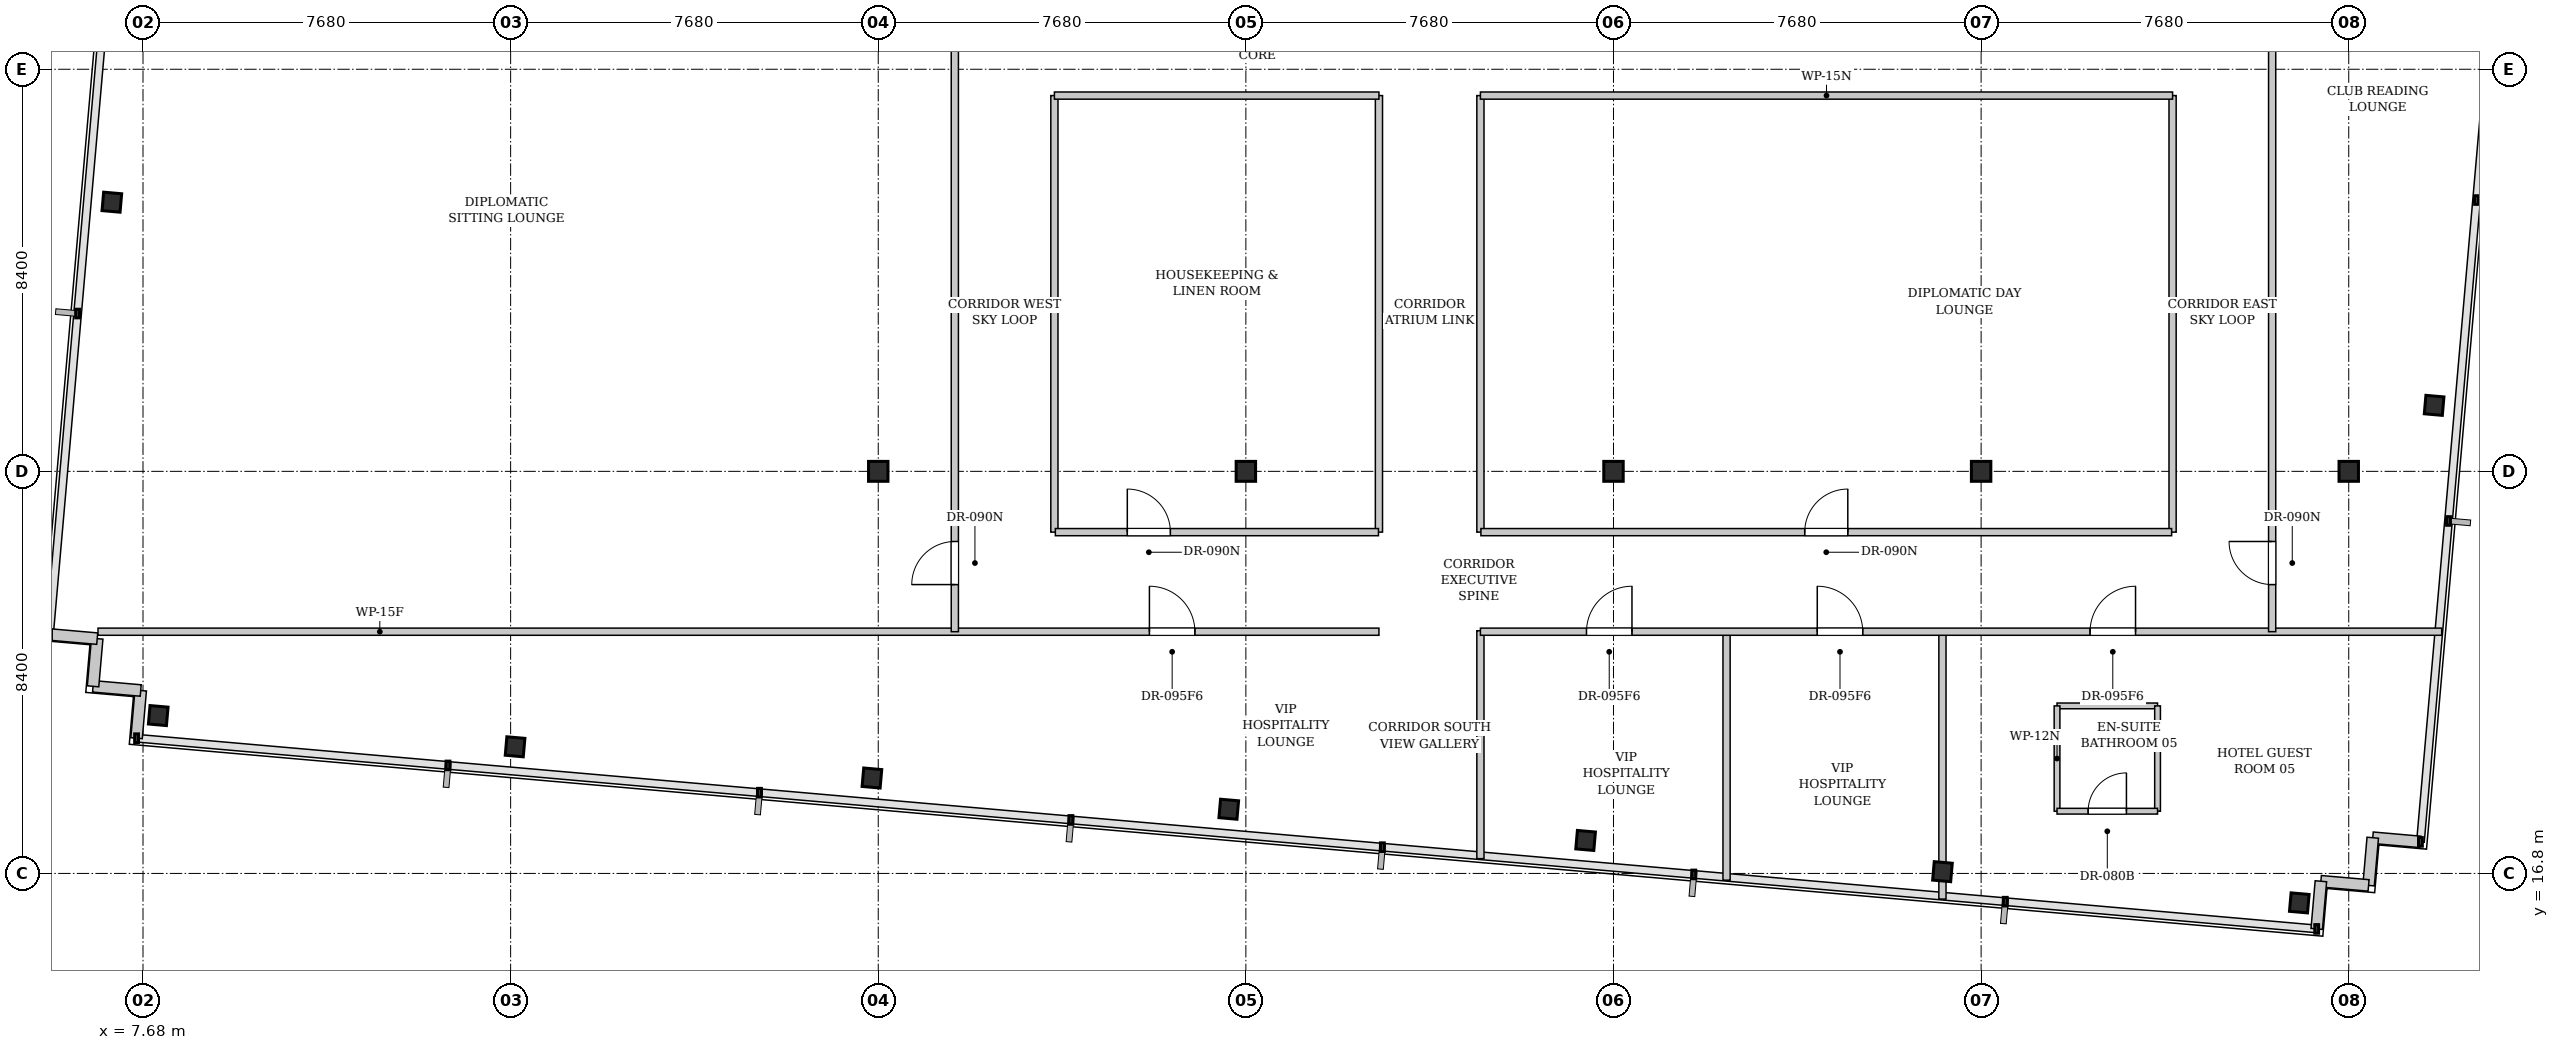
"""IFC4 building model, lengths in metres.
Left out: names, types, materials, properties, quantities, classifications, styles, units other than length and angle.
Written with IfcOpenShell. Run it as: python <this file> out.ifc"""

import sys

from ifc_helpers import new_model, si_unit, direction, frame, frame_2d, origin, origin_2d, place, context, subcontext, project, spatial, rectangle, i_section, extrude, element, fill, save


model = new_model("IFC4")
c1 = context("Model", 3, precision=1e-05, world=origin(), true_north=direction((0.0, 1.0)))
c2 = subcontext(c1, "Body", "Model", "MODEL_VIEW")
j1 = project(units=[si_unit("LENGTHUNIT", "METRE"), si_unit("PLANEANGLEUNIT", "RADIAN")], contexts=[c1])
p1 = place(None, origin())
s1 = spatial("IfcSite", under=j1, at=p1, CompositionType="ELEMENT")
p2 = place(p1, origin())
s2 = spatial("IfcBuilding", under=s1, at=p2, CompositionType="ELEMENT")
p3 = place(p2, frame((0.0, 0.0, 276.1)))
s3 = spatial("IfcBuildingStorey", under=s2, at=p3, CompositionType="ELEMENT", Elevation=276.1)
for number, where, z_axis, x_axis in (
    (1, (23.04, 25.2, 0.0), (0.0, 0.0, 1.0), (1.0, 0.0, 0.0)),
    (2, (30.72, 25.2, 0.0), (0.0, 0.0, 1.0), (1.0, 0.0, 0.0)),
    (3, (38.4, 25.2, 0.0), (0.0, 0.0, 1.0), (1.0, 0.0, 0.0)),
    (4, (46.08, 25.2, 0.0), (0.0, 0.0, 1.0), (1.0, 0.0, 0.0)),
    (5, (53.76, 25.2, 0.0), (0.0, 0.0, 1.0), (1.0, 0.0, 0.0)),
):
    element("IfcColumn", number, at=place(p3, frame(where, z_axis=z_axis, x_axis=x_axis)), inside=s3, PredefinedType="COLUMN", context=c2, shape_type="SweptSolid", body=[
        extrude(i_section(OverallWidth=0.406, OverallDepth=0.416, WebThickness=0.03, FlangeThickness=0.048, FilletRadius=0.015, at=origin_2d()), origin(), (0.0, 0.0, 1.0), 3.4),
    ])
for number, where, z_axis, x_axis in (
    (6, (7.998, 20.098, 0.0), (0.0, 0.0, 1.0), (0.996, -0.087, 0.0)),
    (7, (15.453, 19.446, 0.0), (0.0, 0.0, 1.0), (0.996, -0.087, 0.0)),
    (8, (22.908, 18.793, 0.0), (0.0, 0.0, 1.0), (0.996, -0.087, 0.0)),
    (9, (30.363, 18.141, 0.0), (0.0, 0.0, 1.0), (0.996, -0.087, 0.0)),
    (10, (37.817, 17.489, 0.0), (0.0, 0.0, 1.0), (0.996, -0.087, 0.0)),
    (11, (45.272, 16.837, 0.0), (0.0, 0.0, 1.0), (0.996, -0.087, 0.0)),
    (12, (52.727, 16.185, 0.0), (0.0, 0.0, 1.0), (0.996, -0.087, 0.0)),
    (13, (7.029, 30.823, 0.0), (0.0, 0.0, 1.0), (0.996, -0.087, 0.0)),
    (14, (55.544, 26.579, 0.0), (0.0, 0.0, 1.0), (0.996, -0.087, 0.0)),
):
    element("IfcColumn", number, at=place(p3, frame(where, z_axis=z_axis, x_axis=x_axis)), inside=s3, PredefinedType="COLUMN", context=c2, shape_type="SweptSolid", body=[
        extrude(i_section(OverallWidth=0.378, OverallDepth=0.387, WebThickness=0.021, FlangeThickness=0.033, FilletRadius=0.015, at=origin_2d()), origin(), (0.0, 0.0, 1.0), 3.4),
    ])
for number, where, z_axis, x_axis in (
    (15, (7.545, 19.625, 0.0), (0.0, 0.0, 1.0), (0.087, 0.996, 0.0)),
    (16, (7.632, 20.622, 0.0), (0.0, 0.0, 1.0), (-0.996, 0.087, 0.0)),
):
    element("IfcWall", number, at=place(p3, frame(where, z_axis=z_axis, x_axis=x_axis)), inside=s3, PredefinedType="SOLIDWALL", context=c2, shape_type="SweptSolid", body=[
        extrude(rectangle(XDim=1.0, YDim=0.24, at=frame_2d((0.5, 0.0))), origin(), (0.0, 0.0, 1.0), 3.18),
    ])
for number, where, z_axis, x_axis in (
    (17, (6.636, 20.709, 0.0), (0.0, 0.0, 1.0), (0.087, 0.996, 0.0)),
    (18, (6.723, 21.705, 0.0), (0.0, 0.0, 1.0), (-0.996, 0.087, 0.0)),
):
    element("IfcWall", number, at=place(p3, frame(where, z_axis=z_axis, x_axis=x_axis)), inside=s3, PredefinedType="SOLIDWALL", context=c2, shape_type="SweptSolid", body=[
        extrude(rectangle(XDim=1.0, YDim=0.24, at=frame_2d((0.5, 0.0))), origin(), (0.0, 0.0, 1.0), 3.18),
    ])
for number, where, z_axis, x_axis in (
    (19, (55.258, 17.459, 0.0), (0.0, 0.0, 1.0), (-0.996, 0.087, 0.0)),
    (20, (54.262, 17.546, 0.0), (0.0, 0.0, 1.0), (-0.087, -0.996, 0.0)),
):
    element("IfcWall", number, at=place(p3, frame(where, z_axis=z_axis, x_axis=x_axis)), inside=s3, PredefinedType="SOLIDWALL", context=c2, shape_type="SweptSolid", body=[
        extrude(rectangle(XDim=1.0, YDim=0.24, at=frame_2d((0.5, 0.0))), origin(), (0.0, 0.0, 1.0), 3.18),
    ])
for number, where, z_axis, x_axis in (
    (21, (54.175, 16.55, 0.0), (0.0, 0.0, 1.0), (-0.996, 0.087, 0.0)),
    (22, (53.178, 16.637, 0.0), (0.0, 0.0, 1.0), (-0.087, -0.996, 0.0)),
):
    element("IfcWall", number, at=place(p3, frame(where, z_axis=z_axis, x_axis=x_axis)), inside=s3, PredefinedType="SOLIDWALL", context=c2, shape_type="SweptSolid", body=[
        extrude(rectangle(XDim=1.0, YDim=0.24, at=frame_2d((0.5, 0.0))), origin(), (0.0, 0.0, 1.0), 3.18),
    ])
p4 = place(p3, frame((35.62, 17.109, 0.0), z_axis=(0.0, 0.0, 1.0), x_axis=(0.0, 1.0, 0.0)))
e23 = element("IfcWall", 23, at=p4, inside=s3, PredefinedType="PARTITIONING", context=c2, shape_type="SweptSolid", body=[
    extrude(rectangle(XDim=4.761, YDim=0.15, at=frame_2d((2.381, 0.0))), origin(), (0.0, 0.0, 1.0), 3.18),
])
p5 = place(p3, frame((40.762, 16.659, 0.0), z_axis=(0.0, 0.0, 1.0), x_axis=(0.0, 1.0, 0.0)))
e24 = element("IfcWall", 24, at=p5, inside=s3, PredefinedType="PARTITIONING", context=c2, shape_type="SweptSolid", body=[
    extrude(rectangle(XDim=5.211, YDim=0.15, at=frame_2d((2.605, 0.0))), origin(), (0.0, 0.0, 1.0), 3.18),
])
p6 = place(p3, frame((47.666, 20.3, 0.0), z_axis=(0.0, 0.0, 1.0), x_axis=(1.0, 0.0, 0.0)))
e25 = element("IfcWall", 25, at=p6, inside=s3, PredefinedType="PARTITIONING", context=c2, shape_type="SweptSolid", body=[
    extrude(rectangle(XDim=2.1, YDim=0.12, at=frame_2d((1.05, 0.0))), origin(), (0.0, 0.0, 1.0), 3.18),
])
for number, where, z_axis, x_axis in (
    (26, (47.666, 18.1, 0.0), (0.0, 0.0, 1.0), (0.0, 1.0, 0.0)),
    (27, (49.766, 18.1, 0.0), (0.0, 0.0, 1.0), (0.0, 1.0, 0.0)),
):
    element("IfcWall", number, at=place(p3, frame(where, z_axis=z_axis, x_axis=x_axis)), inside=s3, PredefinedType="PARTITIONING", context=c2, shape_type="SweptSolid", body=[
        extrude(rectangle(XDim=2.2, YDim=0.12, at=frame_2d((1.1, 0.0))), origin(), (0.0, 0.0, 1.0), 3.18),
    ])
p7 = place(p3, frame((47.666, 18.1, 0.0), z_axis=(0.0, 0.0, 1.0), x_axis=(1.0, 0.0, 0.0)))
e28 = element("IfcWall", 28, at=p7, inside=s3, PredefinedType="PARTITIONING", context=c2, shape_type="SweptSolid", body=[
    extrude(rectangle(XDim=2.1, YDim=0.12, at=frame_2d((1.05, 0.0))), origin(), (0.0, 0.0, 1.0), 3.18),
])
p8 = place(p7, frame((0.65, 0.0, 0.0)))
e29 = element("IfcOpeningElement", 29, at=p8, cuts=e28, PredefinedType="OPENING", context=c2, shape_type="SweptSolid", body=[
    extrude(rectangle(XDim=0.8, YDim=2.1, at=frame_2d((0.4, 1.05))), frame((0.0, 0.07, 0.0), z_axis=(0.0, -1.0, 0.0), x_axis=(1.0, 0.0, 0.0)), (0.0, 0.0, 1.0), 0.14),
])
p9 = place(p3, frame((45.272, 16.264, 0.0), z_axis=(0.0, 0.0, 1.0), x_axis=(0.0, 1.0, 0.0)))
e30 = element("IfcWall", 30, at=p9, inside=s3, PredefinedType="PARTITIONING", context=c2, shape_type="SweptSolid", body=[
    extrude(rectangle(XDim=5.606, YDim=0.15, at=frame_2d((2.803, 0.0))), origin(), (0.0, 0.0, 1.0), 2.575),
])
p10 = place(p3, frame((6.74, 21.85, 0.0), z_axis=(0.0, 0.0, 1.0), x_axis=(1.0, 0.0, 0.0)))
e31 = element("IfcWall", 31, at=p10, inside=s3, PredefinedType="PARTITIONING", context=c2, shape_type="SweptSolid", body=[
    extrude(rectangle(XDim=26.76, YDim=0.15, at=frame_2d((13.38, 0.0))), origin(), (0.0, 0.0, 1.0), 2.575),
])
p11 = place(p10, frame((21.965, 0.0, 0.0)))
e32 = element("IfcOpeningElement", 32, at=p11, cuts=e31, PredefinedType="OPENING", context=c2, shape_type="SweptSolid", body=[
    extrude(rectangle(XDim=0.95, YDim=2.15, at=frame_2d((0.475, 1.075))), frame((0.0, 0.085, 0.0), z_axis=(0.0, -1.0, 0.0), x_axis=(1.0, 0.0, 0.0)), (0.0, 0.0, 1.0), 0.17),
])
p12 = place(p3, frame((35.62, 21.85, 0.0), z_axis=(0.0, 0.0, 1.0), x_axis=(1.0, 0.0, 0.0)))
e33 = element("IfcWall", 33, at=p12, inside=s3, PredefinedType="PARTITIONING", context=c2, shape_type="SweptSolid", body=[
    extrude(rectangle(XDim=20.082, YDim=0.15, at=frame_2d((10.041, 0.0))), origin(), (0.0, 0.0, 1.0), 3.18),
])
p13 = place(p12, frame((2.216, 0.0, 0.0)))
e34 = element("IfcOpeningElement", 34, at=p13, cuts=e33, PredefinedType="OPENING", context=c2, shape_type="SweptSolid", body=[
    extrude(rectangle(XDim=0.95, YDim=2.15, at=frame_2d((0.475, 1.075))), frame((0.0, 0.085, 0.0), z_axis=(0.0, -1.0, 0.0), x_axis=(1.0, 0.0, 0.0)), (0.0, 0.0, 1.0), 0.17),
])
p14 = place(p12, frame((7.037, 0.0, 0.0)))
e35 = element("IfcOpeningElement", 35, at=p14, cuts=e33, PredefinedType="OPENING", context=c2, shape_type="SweptSolid", body=[
    extrude(rectangle(XDim=0.95, YDim=2.15, at=frame_2d((0.475, 1.075))), frame((0.0, 0.085, 0.0), z_axis=(0.0, -1.0, 0.0), x_axis=(1.0, 0.0, 0.0)), (0.0, 0.0, 1.0), 0.17),
])
p15 = place(p12, frame((12.736, 0.0, 0.0)))
e36 = element("IfcOpeningElement", 36, at=p15, cuts=e33, PredefinedType="OPENING", context=c2, shape_type="SweptSolid", body=[
    extrude(rectangle(XDim=0.95, YDim=2.15, at=frame_2d((0.475, 1.075))), frame((0.0, 0.085, 0.0), z_axis=(0.0, -1.0, 0.0), x_axis=(1.0, 0.0, 0.0)), (0.0, 0.0, 1.0), 0.17),
])
p16 = place(p3, frame((24.64, 21.85, 0.0), z_axis=(0.0, 0.0, 1.0), x_axis=(0.0, 1.0, 0.0)))
e37 = element("IfcWall", 37, at=p16, inside=s3, PredefinedType="PARTITIONING", context=c2, shape_type="SweptSolid", body=[
    extrude(rectangle(XDim=13.29, YDim=0.15, at=frame_2d((6.645, 0.0))), origin(), (0.0, 0.0, 1.0), 3.18),
])
p17 = place(p16, frame((0.984, 0.0, 0.0)))
e38 = element("IfcOpeningElement", 38, at=p17, cuts=e37, PredefinedType="OPENING", context=c2, shape_type="SweptSolid", body=[
    extrude(rectangle(XDim=0.9, YDim=2.15, at=frame_2d((0.45, 1.075))), frame((0.0, 0.085, 0.0), z_axis=(0.0, -1.0, 0.0), x_axis=(1.0, 0.0, 0.0)), (0.0, 0.0, 1.0), 0.17),
])
p18 = place(p3, frame((52.16, 21.85, 0.0), z_axis=(0.0, 0.0, 1.0), x_axis=(0.0, 1.0, 0.0)))
e39 = element("IfcWall", 39, at=p18, inside=s3, PredefinedType="PARTITIONING", context=c2, shape_type="SweptSolid", body=[
    extrude(rectangle(XDim=13.29, YDim=0.15, at=frame_2d((6.645, 0.0))), origin(), (0.0, 0.0, 1.0), 3.18),
])
p19 = place(p18, frame((0.984, 0.0, 0.0)))
e40 = element("IfcOpeningElement", 40, at=p19, cuts=e39, PredefinedType="OPENING", context=c2, shape_type="SweptSolid", body=[
    extrude(rectangle(XDim=0.9, YDim=2.15, at=frame_2d((0.45, 1.075))), frame((0.0, 0.085, 0.0), z_axis=(0.0, -1.0, 0.0), x_axis=(1.0, 0.0, 0.0)), (0.0, 0.0, 1.0), 0.17),
])
for number, where, z_axis, x_axis in (
    (41, (26.72, 23.93, 0.0), (0.0, 0.0, 1.0), (0.0, 1.0, 0.0)),
    (42, (50.08, 23.93, 0.0), (0.0, 0.0, 1.0), (0.0, 1.0, 0.0)),
    (43, (33.5, 23.93, 0.0), (0.0, 0.0, 1.0), (0.0, 1.0, 0.0)),
    (44, (35.62, 23.93, 0.0), (0.0, 0.0, 1.0), (0.0, 1.0, 0.0)),
):
    element("IfcWall", number, at=place(p3, frame(where, z_axis=z_axis, x_axis=x_axis)), inside=s3, PredefinedType="PARTITIONING", context=c2, shape_type="SweptSolid", body=[
        extrude(rectangle(XDim=9.12, YDim=0.15, at=frame_2d((4.56, 0.0))), origin(), (0.0, 0.0, 1.0), 3.18),
    ])
p20 = place(p3, frame((26.72, 33.05, 0.0), z_axis=(0.0, 0.0, 1.0), x_axis=(1.0, 0.0, 0.0)))
e45 = element("IfcWall", 45, at=p20, inside=s3, PredefinedType="PARTITIONING", context=c2, shape_type="SweptSolid", body=[
    extrude(rectangle(XDim=6.78, YDim=0.15, at=frame_2d((3.39, 0.0))), origin(), (0.0, 0.0, 1.0), 3.18),
])
p21 = place(p3, frame((35.62, 33.05, 0.0), z_axis=(0.0, 0.0, 1.0), x_axis=(1.0, 0.0, 0.0)))
e46 = element("IfcWall", 46, at=p21, inside=s3, PredefinedType="PARTITIONING", context=c2, shape_type="SweptSolid", body=[
    extrude(rectangle(XDim=14.46, YDim=0.15, at=frame_2d((7.23, 0.0))), origin(), (0.0, 0.0, 1.0), 3.18),
])
p22 = place(p3, frame((26.74, 23.93, 0.0), z_axis=(0.0, 0.0, 1.0), x_axis=(1.0, 0.0, 0.0)))
e47 = element("IfcWall", 47, at=p22, inside=s3, PredefinedType="PARTITIONING", context=c2, shape_type="SweptSolid", body=[
    extrude(rectangle(XDim=6.75, YDim=0.15, at=frame_2d((3.375, 0.0))), origin(), (0.0, 0.0, 1.0), 3.18),
])
p23 = place(p22, frame((1.503, 0.0, 0.0)))
e48 = element("IfcOpeningElement", 48, at=p23, cuts=e47, PredefinedType="OPENING", context=c2, shape_type="SweptSolid", body=[
    extrude(rectangle(XDim=0.9, YDim=2.15, at=frame_2d((0.45, 1.075))), frame((0.0, 0.085, 0.0), z_axis=(0.0, -1.0, 0.0), x_axis=(1.0, 0.0, 0.0)), (0.0, 0.0, 1.0), 0.17),
])
p24 = place(p3, frame((35.63, 23.93, 0.0), z_axis=(0.0, 0.0, 1.0), x_axis=(1.0, 0.0, 0.0)))
e49 = element("IfcWall", 49, at=p24, inside=s3, PredefinedType="PARTITIONING", context=c2, shape_type="SweptSolid", body=[
    extrude(rectangle(XDim=14.43, YDim=0.15, at=frame_2d((7.215, 0.0))), origin(), (0.0, 0.0, 1.0), 3.18),
])
p25 = place(p24, frame((6.765, 0.0, 0.0)))
e50 = element("IfcOpeningElement", 50, at=p25, cuts=e49, PredefinedType="OPENING", context=c2, shape_type="SweptSolid", body=[
    extrude(rectangle(XDim=0.9, YDim=2.15, at=frame_2d((0.45, 1.075))), frame((0.0, 0.085, 0.0), z_axis=(0.0, -1.0, 0.0), x_axis=(1.0, 0.0, 0.0)), (0.0, 0.0, 1.0), 0.17),
])
p26 = place(p8, origin())
e51 = element("IfcDoor", 51, at=p26, inside=s3, OperationType="SINGLE_SWING_RIGHT", PredefinedType="DOOR", context=c2, shape_type="SweptSolid", body=[
    extrude(rectangle(XDim=0.8, YDim=2.1, at=frame_2d((0.4, 1.05))), frame((0.0, 0.025, 0.0), z_axis=(0.0, -1.0, 0.0), x_axis=(1.0, 0.0, 0.0)), (0.0, 0.0, 1.0), 0.05),
])
fill(e29, e51)
p27 = place(p11, origin())
e52 = element("IfcDoor", 52, at=p27, inside=s3, OperationType="SINGLE_SWING_LEFT", PredefinedType="DOOR", context=c2, shape_type="SweptSolid", body=[
    extrude(rectangle(XDim=0.95, YDim=2.15, at=frame_2d((0.475, 1.075))), frame((0.0, 0.025, 0.0), z_axis=(0.0, -1.0, 0.0), x_axis=(1.0, 0.0, 0.0)), (0.0, 0.0, 1.0), 0.05),
])
fill(e32, e52)
p28 = place(p13, origin())
e53 = element("IfcDoor", 53, at=p28, inside=s3, OperationType="SINGLE_SWING_RIGHT", PredefinedType="DOOR", context=c2, shape_type="SweptSolid", body=[
    extrude(rectangle(XDim=0.95, YDim=2.15, at=frame_2d((0.475, 1.075))), frame((0.0, 0.025, 0.0), z_axis=(0.0, -1.0, 0.0), x_axis=(1.0, 0.0, 0.0)), (0.0, 0.0, 1.0), 0.05),
])
fill(e34, e53)
p29 = place(p14, origin())
e54 = element("IfcDoor", 54, at=p29, inside=s3, OperationType="SINGLE_SWING_LEFT", PredefinedType="DOOR", context=c2, shape_type="SweptSolid", body=[
    extrude(rectangle(XDim=0.95, YDim=2.15, at=frame_2d((0.475, 1.075))), frame((0.0, 0.025, 0.0), z_axis=(0.0, -1.0, 0.0), x_axis=(1.0, 0.0, 0.0)), (0.0, 0.0, 1.0), 0.05),
])
fill(e35, e54)
p30 = place(p15, origin())
e55 = element("IfcDoor", 55, at=p30, inside=s3, OperationType="SINGLE_SWING_RIGHT", PredefinedType="DOOR", context=c2, shape_type="SweptSolid", body=[
    extrude(rectangle(XDim=0.95, YDim=2.15, at=frame_2d((0.475, 1.075))), frame((0.0, 0.025, 0.0), z_axis=(0.0, -1.0, 0.0), x_axis=(1.0, 0.0, 0.0)), (0.0, 0.0, 1.0), 0.05),
])
fill(e36, e55)
p31 = place(p17, origin())
e56 = element("IfcDoor", 56, at=p31, inside=s3, OperationType="SINGLE_SWING_LEFT", PredefinedType="DOOR", context=c2, shape_type="SweptSolid", body=[
    extrude(rectangle(XDim=0.9, YDim=2.15, at=frame_2d((0.45, 1.075))), frame((0.0, 0.025, 0.0), z_axis=(0.0, -1.0, 0.0), x_axis=(1.0, 0.0, 0.0)), (0.0, 0.0, 1.0), 0.05),
])
fill(e38, e56)
p32 = place(p19, origin())
e57 = element("IfcDoor", 57, at=p32, inside=s3, OperationType="SINGLE_SWING_RIGHT", PredefinedType="DOOR", context=c2, shape_type="SweptSolid", body=[
    extrude(rectangle(XDim=0.9, YDim=2.15, at=frame_2d((0.45, 1.075))), frame((0.0, 0.025, 0.0), z_axis=(0.0, -1.0, 0.0), x_axis=(1.0, 0.0, 0.0)), (0.0, 0.0, 1.0), 0.05),
])
fill(e40, e57)
p33 = place(p23, origin())
e58 = element("IfcDoor", 58, at=p33, inside=s3, OperationType="SINGLE_SWING_LEFT", PredefinedType="DOOR", context=c2, shape_type="SweptSolid", body=[
    extrude(rectangle(XDim=0.9, YDim=2.15, at=frame_2d((0.45, 1.075))), frame((0.0, 0.025, 0.0), z_axis=(0.0, -1.0, 0.0), x_axis=(1.0, 0.0, 0.0)), (0.0, 0.0, 1.0), 0.05),
])
fill(e48, e58)
p34 = place(p25, origin())
e59 = element("IfcDoor", 59, at=p34, inside=s3, OperationType="SINGLE_SWING_RIGHT", PredefinedType="DOOR", context=c2, shape_type="SweptSolid", body=[
    extrude(rectangle(XDim=0.9, YDim=2.15, at=frame_2d((0.45, 1.075))), frame((0.0, 0.025, 0.0), z_axis=(0.0, -1.0, 0.0), x_axis=(1.0, 0.0, 0.0)), (0.0, 0.0, 1.0), 0.05),
])
fill(e50, e59)
save(model, sys.argv[1])
